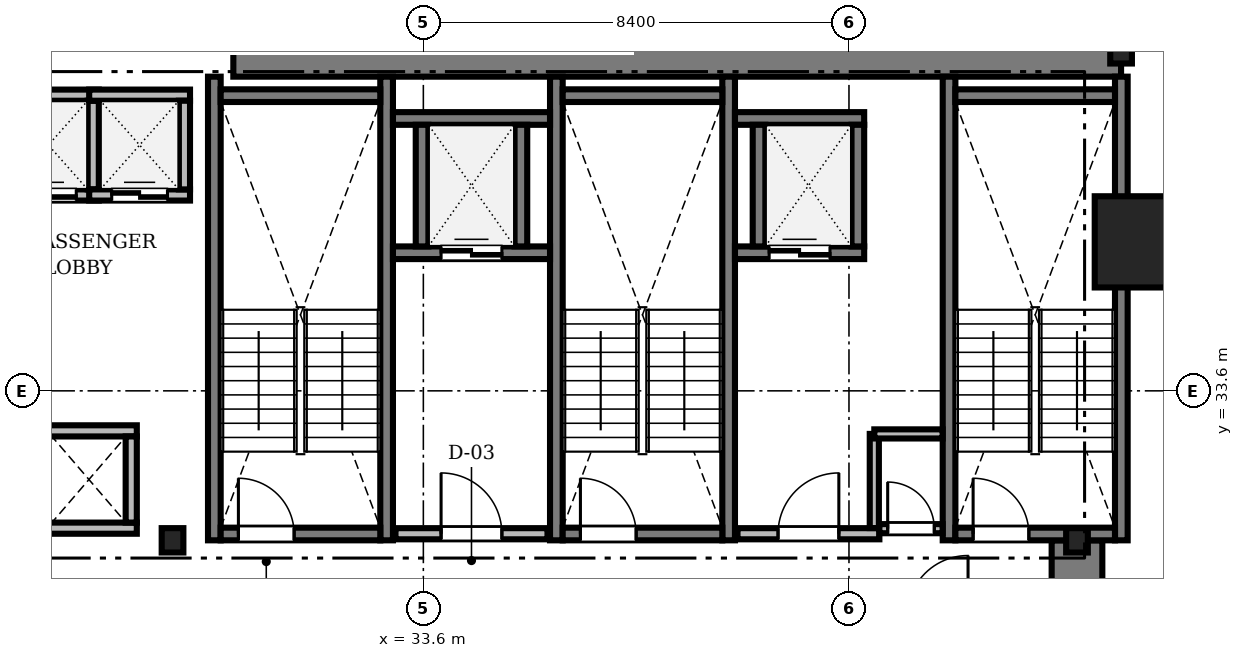
"""IFC4 building model, lengths in metres.
Left out: names, types, materials, properties, quantities, classifications, styles, units other than length and angle.
Written with IfcOpenShell. Run it as: python <this file> out.ifc"""

import sys

from ifc_helpers import new_model, si_unit, direction, frame, frame_2d, origin, origin_2d, place, context, subcontext, project, spatial, rectangle, i_section, extrude, source, transform, mapped, element, fill, save


model = new_model("IFC4")
c1 = context("Model", 3, precision=1e-05, world=origin(), true_north=direction((0.0, 1.0)))
c2 = subcontext(c1, "Body", "Model", "MODEL_VIEW")
j1 = project(units=[si_unit("LENGTHUNIT", "METRE"), si_unit("PLANEANGLEUNIT", "RADIAN")], contexts=[c1])
p1 = place(None, origin())
s1 = spatial("IfcSite", under=j1, at=p1, CompositionType="ELEMENT")
p2 = place(p1, origin())
s2 = spatial("IfcBuilding", under=s1, at=p2, CompositionType="ELEMENT")
p3 = place(p2, frame((0.0, 0.0, 78.7)))
s3 = spatial("IfcBuildingStorey", under=s2, at=p3, CompositionType="ELEMENT", Elevation=78.7)
m1 = source(origin(), c2, "Body", "SweptSolid", [
    extrude(rectangle(XDim=17.52, YDim=1.0, at=frame_2d((8.76, 0.0))), origin(), (0.0, 0.0, 1.0), 3.41),
])
p4 = place(p3, frame((29.85, 40.3, 0.0), z_axis=(0.0, 0.0, 1.0), x_axis=(1.0, 0.0, 0.0)))
e1 = element("IfcWall", 1, at=p4, inside=s3, PredefinedType="SHEAR", context=c2, shape_type="MappedRepresentation", body=[
    mapped(m1, transform((0.0, 0.0, 0.0), scale=1.0)),
])
m2 = source(origin(), c2, "Body", "SweptSolid", [
    extrude(rectangle(XDim=13.15, YDim=1.0, at=frame_2d((6.575, 0.0))), origin(), (0.0, 0.0, 1.0), 3.41),
])
p5 = place(p3, frame((46.5, 17.5, 0.0), z_axis=(0.0, 0.0, 1.0), x_axis=(0.0, 1.0, 0.0)))
e2 = element("IfcWall", 2, at=p5, inside=s3, PredefinedType="SHEAR", context=c2, shape_type="MappedRepresentation", body=[
    mapped(m2, transform((0.0, 0.0, 0.0), scale=1.0)),
])
m3 = source(origin(), c2, "Body", "SweptSolid", [
    extrude(i_section(OverallWidth=0.428, OverallDepth=0.481, WebThickness=0.04, FlangeThickness=0.063, FilletRadius=0.015, at=origin_2d()), origin(), (0.0, 0.0, 1.0), 3.41),
])
for number, where, z_axis, x_axis in (
    (3, (28.65, 30.65, 0.0), (0.0, 0.0, 1.0), (1.0, 0.0, 0.0)),
    (4, (46.5, 30.65, 0.0), (0.0, 0.0, 1.0), (1.0, 0.0, 0.0)),
    (5, (47.37, 40.3, 0.0), (0.0, 0.0, 1.0), (1.0, 0.0, 0.0)),
):
    element("IfcColumn", number, at=place(p3, frame(where, z_axis=z_axis, x_axis=x_axis)), inside=s3, PredefinedType="COLUMN", context=c2, shape_type="MappedRepresentation", body=[
        mapped(m3, transform((0.0, 0.0, 0.0), scale=1.0)),
    ])
m4 = source(origin(), c2, "Body", "SweptSolid", [
    extrude(rectangle(XDim=1.8, YDim=1.8, at=origin_2d()), origin(), (0.0, 0.0, 1.0), 3.41),
])
p6 = place(p3, frame((47.75, 36.54, 0.0), z_axis=(0.0, 0.0, 1.0), x_axis=(1.0, 0.0, 0.0)))
e6 = element("IfcColumn", 6, at=p6, inside=s3, PredefinedType="COLUMN", context=c2, shape_type="MappedRepresentation", body=[
    mapped(m4, transform((0.0, 0.0, 0.0), scale=1.0)),
])
m5 = source(origin(), c2, "Body", "SweptSolid", [
    extrude(rectangle(XDim=9.15, YDim=0.25, at=frame_2d((4.575, 0.0))), origin(), (0.0, 0.0, 1.0), 3.45),
])
for number, where, z_axis, x_axis in (
    (7, (29.475, 30.65, 0.0), (0.0, 0.0, 1.0), (0.0, 1.0, 0.0)),
    (8, (32.875, 30.65, 0.0), (0.0, 0.0, 1.0), (0.0, 1.0, 0.0)),
):
    element("IfcWall", number, at=place(p3, frame(where, z_axis=z_axis, x_axis=x_axis)), inside=s3, PredefinedType="SOLIDWALL", context=c2, shape_type="MappedRepresentation", body=[
        mapped(m5, transform((0.0, 0.0, 0.0), scale=1.0)),
    ])
m6 = source(origin(), c2, "Body", "SweptSolid", [
    extrude(rectangle(XDim=3.15, YDim=0.25, at=frame_2d((1.575, 0.0))), origin(), (0.0, 0.0, 1.0), 3.45),
])
p7 = place(p3, frame((29.6, 39.425, 0.0), z_axis=(0.0, 0.0, 1.0), x_axis=(1.0, 0.0, 0.0)))
e9 = element("IfcWall", 9, at=p7, inside=s3, PredefinedType="SOLIDWALL", context=c2, shape_type="MappedRepresentation", body=[
    mapped(m6, transform((0.0, 0.0, 0.0), scale=1.0)),
])
p8 = place(p3, frame((29.6, 30.775, 0.0), z_axis=(0.0, 0.0, 1.0), x_axis=(1.0, 0.0, 0.0)))
e10 = element("IfcWall", 10, at=p8, inside=s3, PredefinedType="SOLIDWALL", context=c2, shape_type="MappedRepresentation", body=[
    mapped(m6, transform((0.0, 0.0, 0.0), scale=1.0)),
])
m7 = source(origin(), c2, "Body", "SweptSolid", [
    extrude(rectangle(XDim=1.1, YDim=2.2, at=frame_2d((0.55, 1.1))), frame((0.0, 0.135, 0.0), z_axis=(0.0, -1.0, 0.0), x_axis=(1.0, 0.0, 0.0)), (0.0, 0.0, 1.0), 0.27),
])
p9 = place(p8, frame((0.35, 0.0, 0.0)))
e11 = element("IfcOpeningElement", 11, at=p9, cuts=e10, PredefinedType="OPENING", context=c2, shape_type="MappedRepresentation", body=[
    mapped(m7, transform((0.0, 0.0, 0.0), scale=1.0)),
])
for number, where, z_axis, x_axis in (
    (12, (36.225, 30.65, 0.0), (0.0, 0.0, 1.0), (0.0, 1.0, 0.0)),
    (13, (39.625, 30.65, 0.0), (0.0, 0.0, 1.0), (0.0, 1.0, 0.0)),
):
    element("IfcWall", number, at=place(p3, frame(where, z_axis=z_axis, x_axis=x_axis)), inside=s3, PredefinedType="SOLIDWALL", context=c2, shape_type="MappedRepresentation", body=[
        mapped(m5, transform((0.0, 0.0, 0.0), scale=1.0)),
    ])
p10 = place(p3, frame((36.35, 39.425, 0.0), z_axis=(0.0, 0.0, 1.0), x_axis=(1.0, 0.0, 0.0)))
e14 = element("IfcWall", 14, at=p10, inside=s3, PredefinedType="SOLIDWALL", context=c2, shape_type="MappedRepresentation", body=[
    mapped(m6, transform((0.0, 0.0, 0.0), scale=1.0)),
])
p11 = place(p3, frame((36.35, 30.775, 0.0), z_axis=(0.0, 0.0, 1.0), x_axis=(1.0, 0.0, 0.0)))
e15 = element("IfcWall", 15, at=p11, inside=s3, PredefinedType="SOLIDWALL", context=c2, shape_type="MappedRepresentation", body=[
    mapped(m6, transform((0.0, 0.0, 0.0), scale=1.0)),
])
p12 = place(p11, frame((0.35, 0.0, 0.0)))
e16 = element("IfcOpeningElement", 16, at=p12, cuts=e15, PredefinedType="OPENING", context=c2, shape_type="MappedRepresentation", body=[
    mapped(m7, transform((0.0, 0.0, 0.0), scale=1.0)),
])
for number, where, z_axis, x_axis in (
    (17, (43.975, 30.65, 0.0), (0.0, 0.0, 1.0), (0.0, 1.0, 0.0)),
    (18, (47.375, 30.65, 0.0), (0.0, 0.0, 1.0), (0.0, 1.0, 0.0)),
):
    element("IfcWall", number, at=place(p3, frame(where, z_axis=z_axis, x_axis=x_axis)), inside=s3, PredefinedType="SOLIDWALL", context=c2, shape_type="MappedRepresentation", body=[
        mapped(m5, transform((0.0, 0.0, 0.0), scale=1.0)),
    ])
p13 = place(p3, frame((44.1, 39.425, 0.0), z_axis=(0.0, 0.0, 1.0), x_axis=(1.0, 0.0, 0.0)))
e19 = element("IfcWall", 19, at=p13, inside=s3, PredefinedType="SOLIDWALL", context=c2, shape_type="MappedRepresentation", body=[
    mapped(m6, transform((0.0, 0.0, 0.0), scale=1.0)),
])
p14 = place(p3, frame((44.1, 30.775, 0.0), z_axis=(0.0, 0.0, 1.0), x_axis=(1.0, 0.0, 0.0)))
e20 = element("IfcWall", 20, at=p14, inside=s3, PredefinedType="SOLIDWALL", context=c2, shape_type="MappedRepresentation", body=[
    mapped(m6, transform((0.0, 0.0, 0.0), scale=1.0)),
])
p15 = place(p14, frame((0.35, 0.0, 0.0)))
e21 = element("IfcOpeningElement", 21, at=p15, cuts=e20, PredefinedType="OPENING", context=c2, shape_type="MappedRepresentation", body=[
    mapped(m7, transform((0.0, 0.0, 0.0), scale=1.0)),
])
m8 = source(origin(), c2, "Body", "SweptSolid", [
    extrude(rectangle(XDim=3.0, YDim=0.22, at=frame_2d((1.5, 0.0))), origin(), (0.0, 0.0, 1.0), 3.41),
])
p16 = place(p3, frame((33.05, 30.78, 0.0), z_axis=(0.0, 0.0, 1.0), x_axis=(1.0, 0.0, 0.0)))
e22 = element("IfcWall", 22, at=p16, inside=s3, PredefinedType="SOLIDWALL", context=c2, shape_type="MappedRepresentation", body=[
    mapped(m8, transform((0.0, 0.0, 0.0), scale=1.0)),
])
m9 = source(origin(), c2, "Body", "SweptSolid", [
    extrude(rectangle(XDim=1.2, YDim=2.2, at=frame_2d((0.6, 1.1))), frame((0.0, 0.12, 0.0), z_axis=(0.0, -1.0, 0.0), x_axis=(1.0, 0.0, 0.0)), (0.0, 0.0, 1.0), 0.24),
])
p17 = place(p16, frame((0.9, 0.0, 0.0)))
e23 = element("IfcOpeningElement", 23, at=p17, cuts=e22, PredefinedType="OPENING", context=c2, shape_type="MappedRepresentation", body=[
    mapped(m9, transform((0.0, 0.0, 0.0), scale=1.0)),
])
m10 = source(origin(), c2, "Body", "SweptSolid", [
    extrude(rectangle(XDim=2.8, YDim=0.22, at=frame_2d((1.4, 0.0))), origin(), (0.0, 0.0, 1.0), 3.41),
])
p18 = place(p3, frame((39.8, 30.78, 0.0), z_axis=(0.0, 0.0, 1.0), x_axis=(1.0, 0.0, 0.0)))
e24 = element("IfcWall", 24, at=p18, inside=s3, PredefinedType="SOLIDWALL", context=c2, shape_type="MappedRepresentation", body=[
    mapped(m10, transform((0.0, 0.0, 0.0), scale=1.0)),
])
p19 = place(p18, frame((0.8, 0.0, 0.0)))
e25 = element("IfcOpeningElement", 25, at=p19, cuts=e24, PredefinedType="OPENING", context=c2, shape_type="MappedRepresentation", body=[
    mapped(m9, transform((0.0, 0.0, 0.0), scale=1.0)),
])
m11 = source(origin(), c2, "Body", "SweptSolid", [
    extrude(rectangle(XDim=1.99, YDim=0.22, at=frame_2d((0.995, 0.0))), origin(), (0.0, 0.0, 1.0), 3.41),
])
p20 = place(p3, frame((25.205, 37.465, 0.0), z_axis=(0.0, 0.0, 1.0), x_axis=(1.0, 0.0, 0.0)))
e26 = element("IfcWall", 26, at=p20, inside=s3, PredefinedType="SOLIDWALL", context=c2, shape_type="MappedRepresentation", body=[
    mapped(m11, transform((0.0, 0.0, 0.0), scale=1.0)),
])
m12 = source(origin(), c2, "Body", "SweptSolid", [
    extrude(rectangle(XDim=1.1, YDim=2.2, at=frame_2d((0.55, 1.1))), frame((0.0, 0.12, 0.0), z_axis=(0.0, -1.0, 0.0), x_axis=(1.0, 0.0, 0.0)), (0.0, 0.0, 1.0), 0.24),
])
p21 = place(p20, frame((0.445, 0.0, 0.0)))
e27 = element("IfcOpeningElement", 27, at=p21, cuts=e26, PredefinedType="OPENING", context=c2, shape_type="MappedRepresentation", body=[
    mapped(m12, transform((0.0, 0.0, 0.0), scale=1.0)),
])
p22 = place(p3, frame((25.205, 39.435, 0.0), z_axis=(0.0, 0.0, 1.0), x_axis=(1.0, 0.0, 0.0)))
e28 = element("IfcWall", 28, at=p22, inside=s3, PredefinedType="SOLIDWALL", context=c2, shape_type="MappedRepresentation", body=[
    mapped(m11, transform((0.0, 0.0, 0.0), scale=1.0)),
])
m13 = source(origin(), c2, "Body", "SweptSolid", [
    extrude(rectangle(XDim=1.75, YDim=0.22, at=frame_2d((0.875, 0.0))), origin(), (0.0, 0.0, 1.0), 3.41),
])
p23 = place(p3, frame((27.085, 37.575, 0.0), z_axis=(0.0, 0.0, 1.0), x_axis=(0.0, 1.0, 0.0)))
e29 = element("IfcWall", 29, at=p23, inside=s3, PredefinedType="SOLIDWALL", context=c2, shape_type="MappedRepresentation", body=[
    mapped(m13, transform((0.0, 0.0, 0.0), scale=1.0)),
])
m14 = source(origin(), c2, "Body", "SweptSolid", [
    extrude(rectangle(XDim=1.99, YDim=0.22, at=frame_2d((0.995, 0.0))), origin(), (0.0, 0.0, 1.0), 3.41),
])
p24 = place(p3, frame((27.005, 37.465, 0.0), z_axis=(0.0, 0.0, 1.0), x_axis=(1.0, 0.0, 0.0)))
e30 = element("IfcWall", 30, at=p24, inside=s3, PredefinedType="SOLIDWALL", context=c2, shape_type="MappedRepresentation", body=[
    mapped(m14, transform((0.0, 0.0, 0.0), scale=1.0)),
])
p25 = place(p24, frame((0.445, 0.0, 0.0)))
e31 = element("IfcOpeningElement", 31, at=p25, cuts=e30, PredefinedType="OPENING", context=c2, shape_type="MappedRepresentation", body=[
    mapped(m12, transform((0.0, 0.0, 0.0), scale=1.0)),
])
p26 = place(p3, frame((27.005, 39.435, 0.0), z_axis=(0.0, 0.0, 1.0), x_axis=(1.0, 0.0, 0.0)))
e32 = element("IfcWall", 32, at=p26, inside=s3, PredefinedType="SOLIDWALL", context=c2, shape_type="MappedRepresentation", body=[
    mapped(m14, transform((0.0, 0.0, 0.0), scale=1.0)),
])
p27 = place(p3, frame((28.885, 37.575, 0.0), z_axis=(0.0, 0.0, 1.0), x_axis=(0.0, 1.0, 0.0)))
e33 = element("IfcWall", 33, at=p27, inside=s3, PredefinedType="SOLIDWALL", context=c2, shape_type="MappedRepresentation", body=[
    mapped(m13, transform((0.0, 0.0, 0.0), scale=1.0)),
])
m15 = source(origin(), c2, "Body", "SweptSolid", [
    extrude(rectangle(XDim=3.1, YDim=0.25, at=frame_2d((1.55, 0.0))), origin(), (0.0, 0.0, 1.0), 3.41),
])
p28 = place(p3, frame((33.0, 36.325, 0.0), z_axis=(0.0, 0.0, 1.0), x_axis=(1.0, 0.0, 0.0)))
e34 = element("IfcWall", 34, at=p28, inside=s3, PredefinedType="SOLIDWALL", context=c2, shape_type="MappedRepresentation", body=[
    mapped(m15, transform((0.0, 0.0, 0.0), scale=1.0)),
])
m16 = source(origin(), c2, "Body", "SweptSolid", [
    extrude(rectangle(XDim=1.2, YDim=2.25, at=frame_2d((0.6, 1.125))), frame((0.0, 0.135, 0.0), z_axis=(0.0, -1.0, 0.0), x_axis=(1.0, 0.0, 0.0)), (0.0, 0.0, 1.0), 0.27),
])
p29 = place(p28, frame((0.95, 0.0, 0.0)))
e35 = element("IfcOpeningElement", 35, at=p29, cuts=e34, PredefinedType="OPENING", context=c2, shape_type="MappedRepresentation", body=[
    mapped(m16, transform((0.0, 0.0, 0.0), scale=1.0)),
])
p30 = place(p3, frame((33.0, 38.975, 0.0), z_axis=(0.0, 0.0, 1.0), x_axis=(1.0, 0.0, 0.0)))
e36 = element("IfcWall", 36, at=p30, inside=s3, PredefinedType="SOLIDWALL", context=c2, shape_type="MappedRepresentation", body=[
    mapped(m15, transform((0.0, 0.0, 0.0), scale=1.0)),
])
m17 = source(origin(), c2, "Body", "SweptSolid", [
    extrude(rectangle(XDim=2.4, YDim=0.25, at=frame_2d((1.2, 0.0))), origin(), (0.0, 0.0, 1.0), 3.41),
])
for number, where, z_axis, x_axis in (
    (37, (33.575, 36.45, 0.0), (0.0, 0.0, 1.0), (0.0, 1.0, 0.0)),
    (38, (35.525, 36.45, 0.0), (0.0, 0.0, 1.0), (0.0, 1.0, 0.0)),
):
    element("IfcWall", number, at=place(p3, frame(where, z_axis=z_axis, x_axis=x_axis)), inside=s3, PredefinedType="SOLIDWALL", context=c2, shape_type="MappedRepresentation", body=[
        mapped(m17, transform((0.0, 0.0, 0.0), scale=1.0)),
    ])
m18 = source(origin(), c2, "Body", "SweptSolid", [
    extrude(rectangle(XDim=2.55, YDim=0.25, at=frame_2d((1.275, 0.0))), origin(), (0.0, 0.0, 1.0), 3.41),
])
p31 = place(p3, frame((39.75, 36.325, 0.0), z_axis=(0.0, 0.0, 1.0), x_axis=(1.0, 0.0, 0.0)))
e39 = element("IfcWall", 39, at=p31, inside=s3, PredefinedType="SOLIDWALL", context=c2, shape_type="MappedRepresentation", body=[
    mapped(m18, transform((0.0, 0.0, 0.0), scale=1.0)),
])
p32 = place(p31, frame((0.675, 0.0, 0.0)))
e40 = element("IfcOpeningElement", 40, at=p32, cuts=e39, PredefinedType="OPENING", context=c2, shape_type="MappedRepresentation", body=[
    mapped(m16, transform((0.0, 0.0, 0.0), scale=1.0)),
])
p33 = place(p3, frame((39.75, 38.975, 0.0), z_axis=(0.0, 0.0, 1.0), x_axis=(1.0, 0.0, 0.0)))
e41 = element("IfcWall", 41, at=p33, inside=s3, PredefinedType="SOLIDWALL", context=c2, shape_type="MappedRepresentation", body=[
    mapped(m18, transform((0.0, 0.0, 0.0), scale=1.0)),
])
for number, where, z_axis, x_axis in (
    (42, (40.225, 36.45, 0.0), (0.0, 0.0, 1.0), (0.0, 1.0, 0.0)),
    (43, (42.175, 36.45, 0.0), (0.0, 0.0, 1.0), (0.0, 1.0, 0.0)),
):
    element("IfcWall", number, at=place(p3, frame(where, z_axis=z_axis, x_axis=x_axis)), inside=s3, PredefinedType="SOLIDWALL", context=c2, shape_type="MappedRepresentation", body=[
        mapped(m17, transform((0.0, 0.0, 0.0), scale=1.0)),
    ])
m19 = source(origin(), c2, "Body", "SweptSolid", [
    extrude(rectangle(XDim=1.89, YDim=0.22, at=frame_2d((0.945, 0.0))), origin(), (0.0, 0.0, 1.0), 3.41),
])
for number, where, z_axis, x_axis in (
    (44, (26.055, 30.89, 0.0), (0.0, 0.0, 1.0), (1.0, 0.0, 0.0)),
    (45, (26.055, 32.81, 0.0), (0.0, 0.0, 1.0), (1.0, 0.0, 0.0)),
):
    element("IfcWall", number, at=place(p3, frame(where, z_axis=z_axis, x_axis=x_axis)), inside=s3, PredefinedType="SOLIDWALL", context=c2, shape_type="MappedRepresentation", body=[
        mapped(m19, transform((0.0, 0.0, 0.0), scale=1.0)),
    ])
m20 = source(origin(), c2, "Body", "SweptSolid", [
    extrude(rectangle(XDim=1.7, YDim=0.22, at=frame_2d((0.85, 0.0))), origin(), (0.0, 0.0, 1.0), 3.41),
])
p34 = place(p3, frame((27.835, 31.0, 0.0), z_axis=(0.0, 0.0, 1.0), x_axis=(0.0, 1.0, 0.0)))
e46 = element("IfcWall", 46, at=p34, inside=s3, PredefinedType="SOLIDWALL", context=c2, shape_type="MappedRepresentation", body=[
    mapped(m20, transform((0.0, 0.0, 0.0), scale=1.0)),
])
m21 = source(origin(), c2, "Body", "SweptSolid", [
    extrude(rectangle(XDim=1.248, YDim=0.18, at=frame_2d((0.624, 0.0))), origin(), (0.0, 0.0, 1.0), 3.41),
])
p35 = place(p3, frame((42.6, 30.88, 0.0), z_axis=(0.0, 0.0, 1.0), x_axis=(1.0, 0.0, 0.0)))
e47 = element("IfcWall", 47, at=p35, inside=s3, PredefinedType="PARTITIONING", context=c2, shape_type="MappedRepresentation", body=[
    mapped(m21, transform((0.0, 0.0, 0.0), scale=1.0)),
])
m22 = source(origin(), c2, "Body", "SweptSolid", [
    extrude(rectangle(XDim=0.92, YDim=2.1, at=frame_2d((0.46, 1.05))), frame((0.0, 0.1, 0.0), z_axis=(0.0, -1.0, 0.0), x_axis=(1.0, 0.0, 0.0)), (0.0, 0.0, 1.0), 0.2),
])
p36 = place(p35, frame((0.164, 0.0, 0.0)))
e48 = element("IfcOpeningElement", 48, at=p36, cuts=e47, PredefinedType="OPENING", context=c2, shape_type="MappedRepresentation", body=[
    mapped(m22, transform((0.0, 0.0, 0.0), scale=1.0)),
])
m23 = source(origin(), c2, "Body", "SweptSolid", [
    extrude(rectangle(XDim=1.858, YDim=0.18, at=frame_2d((0.929, 0.0))), origin(), (0.0, 0.0, 1.0), 3.41),
])
p37 = place(p3, frame((42.5, 30.892, 0.0), z_axis=(0.0, 0.0, 1.0), x_axis=(0.0, 1.0, 0.0)))
e49 = element("IfcWall", 49, at=p37, inside=s3, PredefinedType="PARTITIONING", context=c2, shape_type="MappedRepresentation", body=[
    mapped(m23, transform((0.0, 0.0, 0.0), scale=1.0)),
])
m24 = source(origin(), c2, "Body", "SweptSolid", [
    extrude(rectangle(XDim=1.348, YDim=0.18, at=frame_2d((0.674, 0.0))), origin(), (0.0, 0.0, 1.0), 3.41),
])
p38 = place(p3, frame((42.5, 32.75, 0.0), z_axis=(0.0, 0.0, 1.0), x_axis=(1.0, 0.0, 0.0)))
e50 = element("IfcWall", 50, at=p38, inside=s3, PredefinedType="PARTITIONING", context=c2, shape_type="MappedRepresentation", body=[
    mapped(m24, transform((0.0, 0.0, 0.0), scale=1.0)),
])
m25 = source(origin(), c2, "Body", "SweptSolid", [
    extrude(rectangle(XDim=1.1, YDim=2.2, at=frame_2d((0.55, 1.1))), frame((0.0, 0.025, 0.0), z_axis=(0.0, -1.0, 0.0), x_axis=(1.0, 0.0, 0.0)), (0.0, 0.0, 1.0), 0.05),
])
p39 = place(p9, origin())
e51 = element("IfcDoor", 51, at=p39, inside=s3, OperationType="SINGLE_SWING_LEFT", PredefinedType="DOOR", context=c2, shape_type="MappedRepresentation", body=[
    mapped(m25, transform((0.0, 0.0, 0.0), scale=1.0)),
])
fill(e11, e51)
p40 = place(p12, origin())
e52 = element("IfcDoor", 52, at=p40, inside=s3, OperationType="SINGLE_SWING_LEFT", PredefinedType="DOOR", context=c2, shape_type="MappedRepresentation", body=[
    mapped(m25, transform((0.0, 0.0, 0.0), scale=1.0)),
])
fill(e16, e52)
p41 = place(p15, origin())
e53 = element("IfcDoor", 53, at=p41, inside=s3, OperationType="SINGLE_SWING_LEFT", PredefinedType="DOOR", context=c2, shape_type="MappedRepresentation", body=[
    mapped(m25, transform((0.0, 0.0, 0.0), scale=1.0)),
])
fill(e21, e53)
m26 = source(origin(), c2, "Body", "SweptSolid", [
    extrude(rectangle(XDim=1.2, YDim=2.2, at=frame_2d((0.6, 1.1))), frame((0.0, 0.025, 0.0), z_axis=(0.0, -1.0, 0.0), x_axis=(1.0, 0.0, 0.0)), (0.0, 0.0, 1.0), 0.05),
])
p42 = place(p17, origin())
e54 = element("IfcDoor", 54, at=p42, inside=s3, OperationType="SINGLE_SWING_LEFT", PredefinedType="DOOR", context=c2, shape_type="MappedRepresentation", body=[
    mapped(m26, transform((0.0, 0.0, 0.0), scale=1.0)),
])
fill(e23, e54)
p43 = place(p19, origin())
e55 = element("IfcDoor", 55, at=p43, inside=s3, OperationType="SINGLE_SWING_RIGHT", PredefinedType="DOOR", context=c2, shape_type="MappedRepresentation", body=[
    mapped(m26, transform((0.0, 0.0, 0.0), scale=1.0)),
])
fill(e25, e55)
p44 = place(p21, origin())
e56 = element("IfcDoor", 56, at=p44, inside=s3, OperationType="DOUBLE_DOOR_SLIDING", PredefinedType="DOOR", context=c2, shape_type="MappedRepresentation", body=[
    mapped(m25, transform((0.0, 0.0, 0.0), scale=1.0)),
])
fill(e27, e56)
p45 = place(p25, origin())
e57 = element("IfcDoor", 57, at=p45, inside=s3, OperationType="DOUBLE_DOOR_SLIDING", PredefinedType="DOOR", context=c2, shape_type="MappedRepresentation", body=[
    mapped(m25, transform((0.0, 0.0, 0.0), scale=1.0)),
])
fill(e31, e57)
m27 = source(origin(), c2, "Body", "SweptSolid", [
    extrude(rectangle(XDim=1.2, YDim=2.25, at=frame_2d((0.6, 1.125))), frame((0.0, 0.025, 0.0), z_axis=(0.0, -1.0, 0.0), x_axis=(1.0, 0.0, 0.0)), (0.0, 0.0, 1.0), 0.05),
])
p46 = place(p29, origin())
e58 = element("IfcDoor", 58, at=p46, inside=s3, OperationType="DOUBLE_DOOR_SLIDING", PredefinedType="DOOR", context=c2, shape_type="MappedRepresentation", body=[
    mapped(m27, transform((0.0, 0.0, 0.0), scale=1.0)),
])
fill(e35, e58)
p47 = place(p32, origin())
e59 = element("IfcDoor", 59, at=p47, inside=s3, OperationType="DOUBLE_DOOR_SLIDING", PredefinedType="DOOR", context=c2, shape_type="MappedRepresentation", body=[
    mapped(m27, transform((0.0, 0.0, 0.0), scale=1.0)),
])
fill(e40, e59)
m28 = source(origin(), c2, "Body", "SweptSolid", [
    extrude(rectangle(XDim=0.92, YDim=2.1, at=frame_2d((0.46, 1.05))), frame((0.0, 0.025, 0.0), z_axis=(0.0, -1.0, 0.0), x_axis=(1.0, 0.0, 0.0)), (0.0, 0.0, 1.0), 0.05),
])
p48 = place(p36, origin())
e60 = element("IfcDoor", 60, at=p48, inside=s3, OperationType="SINGLE_SWING_LEFT", PredefinedType="DOOR", context=c2, shape_type="MappedRepresentation", body=[
    mapped(m28, transform((0.0, 0.0, 0.0), scale=1.0)),
])
fill(e48, e60)
save(model, sys.argv[1])
